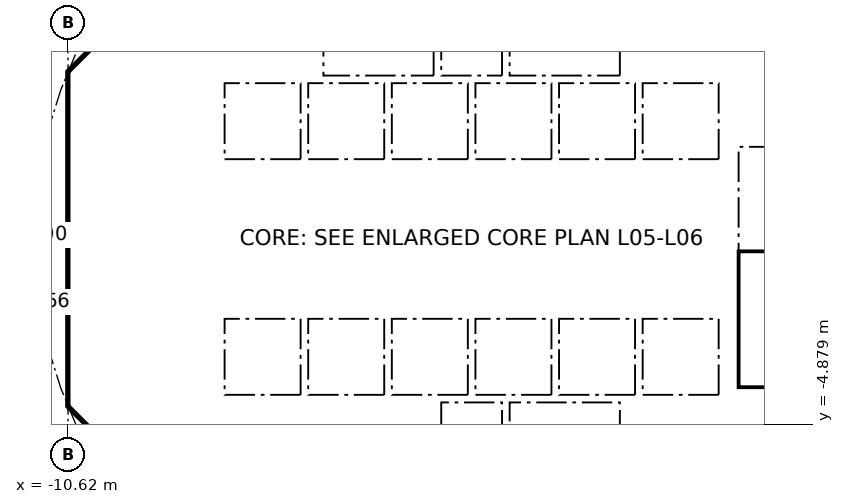
"""IFC4 building model, lengths in metres.
Left out: names, types, materials, properties, quantities, classifications, styles, units other than length and angle.
Written with IfcOpenShell. Run it as: python <this file> out.ifc"""

import sys

from ifc_helpers import new_model, si_unit, direction, frame, frame_2d, origin, place, context, subcontext, project, spatial, polyline, rectangle, outline, extrude, element, fill, save


model = new_model("IFC4")
c1 = context("Model", 3, precision=1e-05, world=origin(), true_north=direction((0.0, 1.0)))
c2 = subcontext(c1, "Body", "Model", "MODEL_VIEW")
j1 = project(units=[si_unit("LENGTHUNIT", "METRE"), si_unit("PLANEANGLEUNIT", "RADIAN")], contexts=[c1])
p1 = place(None, origin())
s1 = spatial("IfcSite", under=j1, at=p1, CompositionType="ELEMENT")
p2 = place(p1, origin())
s2 = spatial("IfcBuilding", under=s1, at=p2, CompositionType="ELEMENT")
p3 = place(p2, frame((0.0, 0.0, 27.0)))
s3 = spatial("IfcBuildingStorey", under=s2, at=p3, CompositionType="ELEMENT", Elevation=27.0)
p4 = place(p3, frame((9.988, 4.613, 0.0), z_axis=(0.0, 0.0, 1.0), x_axis=(-0.707106781187, 0.707106781187, 0.0)))
e1 = element("IfcWall", 1, at=p4, inside=s3, PredefinedType="SHEAR", context=c2, shape_type="SweptSolid", body=[
    extrude(rectangle(XDim=7.602, YDim=0.6, at=frame_2d((3.801, 0.0))), origin(), (0.0, 0.0, 1.0), 3.44),
])
p5 = place(p4, frame((3.201, 0.0, 0.0)))
e2 = element("IfcOpeningElement", 2, at=p5, cuts=e1, PredefinedType="OPENING", context=c2, shape_type="SweptSolid", body=[
    extrude(rectangle(XDim=1.2, YDim=2.1, at=frame_2d((0.6, 1.05))), frame((0.0, 0.31, 0.0), z_axis=(0.0, -1.0, 0.0), x_axis=(1.0, 0.0, 0.0)), (0.0, 0.0, 1.0), 0.62),
])
p6 = place(p3, frame((-4.613, 9.988, 0.0), z_axis=(0.0, 0.0, 1.0), x_axis=(-0.707106781187, -0.707106781187, 0.0)))
e3 = element("IfcWall", 3, at=p6, inside=s3, PredefinedType="SHEAR", context=c2, shape_type="SweptSolid", body=[
    extrude(rectangle(XDim=7.602, YDim=0.6, at=frame_2d((3.801, 0.0))), origin(), (0.0, 0.0, 1.0), 3.44),
])
p7 = place(p6, frame((0.351, 0.0, 0.0)))
e4 = element("IfcOpeningElement", 4, at=p7, cuts=e3, PredefinedType="OPENING", context=c2, shape_type="SweptSolid", body=[
    extrude(rectangle(XDim=1.1, YDim=2.1, at=frame_2d((0.55, 1.05))), frame((0.0, 0.31, 0.0), z_axis=(0.0, -1.0, 0.0), x_axis=(1.0, 0.0, 0.0)), (0.0, 0.0, 1.0), 0.62),
])
p8 = place(p3, frame((-10.325, 3.801, 0.0), z_axis=(0.0, 0.0, 1.0), x_axis=(0.0, -1.0, 0.0)))
e5 = element("IfcWall", 5, at=p8, inside=s3, PredefinedType="SHEAR", context=c2, shape_type="SweptSolid", body=[
    extrude(rectangle(XDim=7.602, YDim=0.6, at=frame_2d((3.801, 0.0))), origin(), (0.0, 0.0, 1.0), 3.44),
])
p9 = place(p8, frame((0.651, 0.0, 0.0)))
e6 = element("IfcOpeningElement", 6, at=p9, cuts=e5, PredefinedType="OPENING", context=c2, shape_type="SweptSolid", body=[
    extrude(rectangle(XDim=1.5, YDim=2.1, at=frame_2d((0.75, 1.05))), frame((0.0, 0.31, 0.0), z_axis=(0.0, -1.0, 0.0), x_axis=(1.0, 0.0, 0.0)), (0.0, 0.0, 1.0), 0.62),
])
p10 = place(p8, frame((5.451, 0.0, 0.0)))
e7 = element("IfcOpeningElement", 7, at=p10, cuts=e5, PredefinedType="OPENING", context=c2, shape_type="SweptSolid", body=[
    extrude(rectangle(XDim=1.5, YDim=2.1, at=frame_2d((0.75, 1.05))), frame((0.0, 0.31, 0.0), z_axis=(0.0, -1.0, 0.0), x_axis=(1.0, 0.0, 0.0)), (0.0, 0.0, 1.0), 0.62),
])
p11 = place(p3, frame((-9.988, -4.613, 0.0), z_axis=(0.0, 0.0, 1.0), x_axis=(0.707106781187, -0.707106781187, 0.0)))
e8 = element("IfcWall", 8, at=p11, inside=s3, PredefinedType="SHEAR", context=c2, shape_type="SweptSolid", body=[
    extrude(rectangle(XDim=7.602, YDim=0.6, at=frame_2d((3.801, 0.0))), origin(), (0.0, 0.0, 1.0), 3.44),
])
p12 = place(p11, frame((6.151, 0.0, 0.0)))
e9 = element("IfcOpeningElement", 9, at=p12, cuts=e8, PredefinedType="OPENING", context=c2, shape_type="SweptSolid", body=[
    extrude(rectangle(XDim=1.1, YDim=2.1, at=frame_2d((0.55, 1.05))), frame((0.0, 0.31, 0.0), z_axis=(0.0, -1.0, 0.0), x_axis=(1.0, 0.0, 0.0)), (0.0, 0.0, 1.0), 0.62),
])
p13 = place(p3, frame((4.613, -9.988, 0.0), z_axis=(0.0, 0.0, 1.0), x_axis=(0.707106781187, 0.707106781187, 0.0)))
e10 = element("IfcWall", 10, at=p13, inside=s3, PredefinedType="SHEAR", context=c2, shape_type="SweptSolid", body=[
    extrude(rectangle(XDim=7.602, YDim=0.6, at=frame_2d((3.801, 0.0))), origin(), (0.0, 0.0, 1.0), 3.44),
])
p14 = place(p13, frame((3.201, 0.0, 0.0)))
e11 = element("IfcOpeningElement", 11, at=p14, cuts=e10, PredefinedType="OPENING", context=c2, shape_type="SweptSolid", body=[
    extrude(rectangle(XDim=1.2, YDim=2.1, at=frame_2d((0.6, 1.05))), frame((0.0, 0.31, 0.0), z_axis=(0.0, -1.0, 0.0), x_axis=(1.0, 0.0, 0.0)), (0.0, 0.0, 1.0), 0.62),
])
p15 = place(p3, frame((-5.8, 4.3, 0.0), z_axis=(0.0, 0.0, 1.0), x_axis=(0.0, 1.0, 0.0)))
e12 = element("IfcWall", 12, at=p15, inside=s3, PredefinedType="PARTITIONING", context=c2, shape_type="SweptSolid", body=[
    extrude(rectangle(XDim=3.927, YDim=0.15, at=frame_2d((1.963, 0.0))), origin(), (0.0, 0.0, 1.0), 3.44),
])
p16 = place(p15, frame((0.413, 0.0, 0.0)))
e13 = element("IfcOpeningElement", 13, at=p16, cuts=e12, PredefinedType="OPENING", context=c2, shape_type="SweptSolid", body=[
    extrude(rectangle(XDim=0.9, YDim=2.1, at=frame_2d((0.45, 1.05))), frame((0.0, 0.085, 0.0), z_axis=(0.0, -1.0, 0.0), x_axis=(1.0, 0.0, 0.0)), (0.0, 0.0, 1.0), 0.17),
])
p17 = place(p15, frame((2.489, 0.0, 0.0)))
e14 = element("IfcOpeningElement", 14, at=p17, cuts=e12, PredefinedType="OPENING", context=c2, shape_type="SweptSolid", body=[
    extrude(rectangle(XDim=0.9, YDim=2.1, at=frame_2d((0.45, 1.05))), frame((0.0, 0.085, 0.0), z_axis=(0.0, -1.0, 0.0), x_axis=(1.0, 0.0, 0.0)), (0.0, 0.0, 1.0), 0.17),
])
p18 = place(p3, frame((4.0, 4.3, 0.0), z_axis=(0.0, 0.0, 1.0), x_axis=(0.0, 1.0, 0.0)))
e15 = element("IfcWall", 15, at=p18, inside=s3, PredefinedType="SOLIDWALL", context=c2, shape_type="SweptSolid", body=[
    extrude(rectangle(XDim=2.2, YDim=0.2, at=frame_2d((1.1, 0.0))), origin(), (0.0, 0.0, 1.0), 3.44),
])
p19 = place(p18, frame((0.55, 0.0, 0.0)))
e16 = element("IfcOpeningElement", 16, at=p19, cuts=e15, PredefinedType="OPENING", context=c2, shape_type="SweptSolid", body=[
    extrude(rectangle(XDim=1.1, YDim=2.1, at=frame_2d((0.55, 1.05))), frame((0.0, 0.11, 0.0), z_axis=(0.0, -1.0, 0.0), x_axis=(1.0, 0.0, 0.0)), (0.0, 0.0, 1.0), 0.22),
])
p20 = place(p3, frame((-4.0, 4.3, 0.0), z_axis=(0.0, 0.0, 1.0), x_axis=(0.0, 1.0, 0.0)))
e17 = element("IfcWall", 17, at=p20, inside=s3, PredefinedType="SOLIDWALL", context=c2, shape_type="SweptSolid", body=[
    extrude(rectangle(XDim=2.2, YDim=0.2, at=frame_2d((1.1, 0.0))), origin(), (0.0, 0.0, 1.0), 3.44),
])
p21 = place(p20, frame((0.55, 0.0, 0.0)))
e18 = element("IfcOpeningElement", 18, at=p21, cuts=e17, PredefinedType="OPENING", context=c2, shape_type="SweptSolid", body=[
    extrude(rectangle(XDim=1.1, YDim=2.1, at=frame_2d((0.55, 1.05))), frame((0.0, 0.11, 0.0), z_axis=(0.0, -1.0, 0.0), x_axis=(1.0, 0.0, 0.0)), (0.0, 0.0, 1.0), 0.22),
])
p22 = place(p3, frame((-6.7, 2.0, 0.0), z_axis=(0.0, 0.0, 1.0), x_axis=(1.0, 0.0, 0.0)))
e19 = element("IfcWall", 19, at=p22, inside=s3, PredefinedType="SOLIDWALL", context=c2, shape_type="SweptSolid", body=[
    extrude(rectangle(XDim=13.4, YDim=0.2, at=frame_2d((6.7, 0.0))), origin(), (0.0, 0.0, 1.0), 3.44),
])
p23 = place(p22, frame((0.65, 0.0, 0.0)))
e20 = element("IfcOpeningElement", 20, at=p23, cuts=e19, PredefinedType="OPENING", context=c2, shape_type="SweptSolid", body=[
    extrude(rectangle(XDim=1.1, YDim=2.1, at=frame_2d((0.55, 1.05))), frame((0.0, 0.11, 0.0), z_axis=(0.0, -1.0, 0.0), x_axis=(1.0, 0.0, 0.0)), (0.0, 0.0, 1.0), 0.22),
])
p24 = place(p22, frame((2.85, 0.0, 0.0)))
e21 = element("IfcOpeningElement", 21, at=p24, cuts=e19, PredefinedType="OPENING", context=c2, shape_type="SweptSolid", body=[
    extrude(rectangle(XDim=1.1, YDim=2.1, at=frame_2d((0.55, 1.05))), frame((0.0, 0.11, 0.0), z_axis=(0.0, -1.0, 0.0), x_axis=(1.0, 0.0, 0.0)), (0.0, 0.0, 1.0), 0.22),
])
p25 = place(p22, frame((5.05, 0.0, 0.0)))
e22 = element("IfcOpeningElement", 22, at=p25, cuts=e19, PredefinedType="OPENING", context=c2, shape_type="SweptSolid", body=[
    extrude(rectangle(XDim=1.1, YDim=2.1, at=frame_2d((0.55, 1.05))), frame((0.0, 0.11, 0.0), z_axis=(0.0, -1.0, 0.0), x_axis=(1.0, 0.0, 0.0)), (0.0, 0.0, 1.0), 0.22),
])
p26 = place(p3, frame((6.7, 4.0, 0.0), z_axis=(0.0, 0.0, 1.0), x_axis=(1.0, 0.0, 0.0)))
e23 = element("IfcWall", 23, at=p26, inside=s3, PredefinedType="SOLIDWALL", context=c2, shape_type="SweptSolid", body=[
    extrude(rectangle(XDim=3.325, YDim=0.2, at=frame_2d((1.662, 0.0))), origin(), (0.0, 0.0, 1.0), 3.44),
])
p27 = place(p26, frame((1.25, 0.0, 0.0)))
e24 = element("IfcOpeningElement", 24, at=p27, cuts=e23, PredefinedType="OPENING", context=c2, shape_type="SweptSolid", body=[
    extrude(rectangle(XDim=1.1, YDim=2.1, at=frame_2d((0.55, 1.05))), frame((0.0, 0.11, 0.0), z_axis=(0.0, -1.0, 0.0), x_axis=(1.0, 0.0, 0.0)), (0.0, 0.0, 1.0), 0.22),
])
p28 = place(p3, frame((-5.8, -8.227, 0.0), z_axis=(0.0, 0.0, 1.0), x_axis=(0.0, 1.0, 0.0)))
e25 = element("IfcWall", 25, at=p28, inside=s3, PredefinedType="PARTITIONING", context=c2, shape_type="SweptSolid", body=[
    extrude(rectangle(XDim=3.927, YDim=0.15, at=frame_2d((1.963, 0.0))), origin(), (0.0, 0.0, 1.0), 3.44),
])
p29 = place(p28, frame((2.615, 0.0, 0.0)))
e26 = element("IfcOpeningElement", 26, at=p29, cuts=e25, PredefinedType="OPENING", context=c2, shape_type="SweptSolid", body=[
    extrude(rectangle(XDim=0.9, YDim=2.1, at=frame_2d((0.45, 1.05))), frame((0.0, 0.085, 0.0), z_axis=(0.0, -1.0, 0.0), x_axis=(1.0, 0.0, 0.0)), (0.0, 0.0, 1.0), 0.17),
])
p30 = place(p28, frame((0.539, 0.0, 0.0)))
e27 = element("IfcOpeningElement", 27, at=p30, cuts=e25, PredefinedType="OPENING", context=c2, shape_type="SweptSolid", body=[
    extrude(rectangle(XDim=0.9, YDim=2.1, at=frame_2d((0.45, 1.05))), frame((0.0, 0.085, 0.0), z_axis=(0.0, -1.0, 0.0), x_axis=(1.0, 0.0, 0.0)), (0.0, 0.0, 1.0), 0.17),
])
p31 = place(p3, frame((4.0, -6.5, 0.0), z_axis=(0.0, 0.0, 1.0), x_axis=(0.0, 1.0, 0.0)))
e28 = element("IfcWall", 28, at=p31, inside=s3, PredefinedType="SOLIDWALL", context=c2, shape_type="SweptSolid", body=[
    extrude(rectangle(XDim=2.2, YDim=0.2, at=frame_2d((1.1, 0.0))), origin(), (0.0, 0.0, 1.0), 3.44),
])
p32 = place(p31, frame((0.55, 0.0, 0.0)))
e29 = element("IfcOpeningElement", 29, at=p32, cuts=e28, PredefinedType="OPENING", context=c2, shape_type="SweptSolid", body=[
    extrude(rectangle(XDim=1.1, YDim=2.1, at=frame_2d((0.55, 1.05))), frame((0.0, 0.11, 0.0), z_axis=(0.0, -1.0, 0.0), x_axis=(1.0, 0.0, 0.0)), (0.0, 0.0, 1.0), 0.22),
])
p33 = place(p3, frame((-4.0, -6.5, 0.0), z_axis=(0.0, 0.0, 1.0), x_axis=(0.0, 1.0, 0.0)))
e30 = element("IfcWall", 30, at=p33, inside=s3, PredefinedType="SOLIDWALL", context=c2, shape_type="SweptSolid", body=[
    extrude(rectangle(XDim=2.2, YDim=0.2, at=frame_2d((1.1, 0.0))), origin(), (0.0, 0.0, 1.0), 3.44),
])
p34 = place(p33, frame((0.65, 0.0, 0.0)))
e31 = element("IfcOpeningElement", 31, at=p34, cuts=e30, PredefinedType="OPENING", context=c2, shape_type="SweptSolid", body=[
    extrude(rectangle(XDim=0.9, YDim=2.1, at=frame_2d((0.45, 1.05))), frame((0.0, 0.11, 0.0), z_axis=(0.0, -1.0, 0.0), x_axis=(1.0, 0.0, 0.0)), (0.0, 0.0, 1.0), 0.22),
])
p35 = place(p3, frame((-6.7, -2.0, 0.0), z_axis=(0.0, 0.0, 1.0), x_axis=(1.0, 0.0, 0.0)))
e32 = element("IfcWall", 32, at=p35, inside=s3, PredefinedType="SOLIDWALL", context=c2, shape_type="SweptSolid", body=[
    extrude(rectangle(XDim=13.4, YDim=0.2, at=frame_2d((6.7, 0.0))), origin(), (0.0, 0.0, 1.0), 3.44),
])
p36 = place(p35, frame((0.65, 0.0, 0.0)))
e33 = element("IfcOpeningElement", 33, at=p36, cuts=e32, PredefinedType="OPENING", context=c2, shape_type="SweptSolid", body=[
    extrude(rectangle(XDim=1.1, YDim=2.1, at=frame_2d((0.55, 1.05))), frame((0.0, 0.11, 0.0), z_axis=(0.0, -1.0, 0.0), x_axis=(1.0, 0.0, 0.0)), (0.0, 0.0, 1.0), 0.22),
])
p37 = place(p35, frame((2.85, 0.0, 0.0)))
e34 = element("IfcOpeningElement", 34, at=p37, cuts=e32, PredefinedType="OPENING", context=c2, shape_type="SweptSolid", body=[
    extrude(rectangle(XDim=1.1, YDim=2.1, at=frame_2d((0.55, 1.05))), frame((0.0, 0.11, 0.0), z_axis=(0.0, -1.0, 0.0), x_axis=(1.0, 0.0, 0.0)), (0.0, 0.0, 1.0), 0.22),
])
p38 = place(p3, origin())
e35 = element("IfcWall", 35, at=p38, inside=s3, PredefinedType="SHEAR", context=c2, shape_type="SweptSolid", body=[
    extrude(outline(polyline([(-10.625, -3.801), (-10.025, -3.801), (-10.025, -4.152), (-9.776, -4.401), (-10.2, -4.825), (-10.625, -4.401), (-10.625, -3.801)])), origin(), (0.0, 0.0, 1.0), 3.44),
])
p39 = place(p3, origin())
e36 = element("IfcWall", 36, at=p39, inside=s3, PredefinedType="SHEAR", context=c2, shape_type="SweptSolid", body=[
    extrude(outline(polyline([(-10.2, 4.825), (-9.776, 4.401), (-10.025, 4.152), (-10.025, 3.801), (-10.625, 3.801), (-10.625, 4.401), (-10.2, 4.825)])), origin(), (0.0, 0.0, 1.0), 3.44),
])
for number, where, z_axis, x_axis in (
    (37, (-10.025, -4.0, 0.0), (0.0, 0.0, 1.0), (1.0, 0.0, 0.0)),
    (38, (-10.025, 4.0, 0.0), (0.0, 0.0, 1.0), (1.0, 0.0, 0.0)),
):
    element("IfcWall", number, at=place(p3, frame(where, z_axis=z_axis, x_axis=x_axis)), inside=s3, PredefinedType="PARTITIONING", context=c2, shape_type="SweptSolid", body=[
        extrude(rectangle(XDim=3.325, YDim=0.2, at=frame_2d((1.662, 0.0))), origin(), (0.0, 0.0, 1.0), 3.44),
    ])
for number, where, z_axis, x_axis in (
    (39, (-0.9, -6.5, 0.0), (0.0, 0.0, 1.0), (0.0, 1.0, 0.0)),
    (40, (0.9, -6.5, 0.0), (0.0, 0.0, 1.0), (0.0, 1.0, 0.0)),
):
    element("IfcWall", number, at=place(p3, frame(where, z_axis=z_axis, x_axis=x_axis)), inside=s3, PredefinedType="SOLIDWALL", context=c2, shape_type="SweptSolid", body=[
        extrude(rectangle(XDim=2.2, YDim=0.2, at=frame_2d((1.1, 0.0))), origin(), (0.0, 0.0, 1.0), 3.44),
    ])
p40 = place(p3, origin())
e41 = element("IfcWall", 41, at=p40, inside=s3, PredefinedType="SOLIDWALL", context=c2, shape_type="SweptSolid", body=[
    extrude(outline(polyline([(-6.7, -2.1), (-6.5, -2.1), (-6.5, -4.1), (-4.5, -4.1), (-4.5, -2.1), (-4.3, -2.1), (-4.3, -4.1), (-2.3, -4.1), (-2.3, -2.1), (-2.1, -2.1), (-2.1, -4.1), (-0.1, -4.1), (-0.1, -2.1), (0.1, -2.1), (0.1, -4.1), (2.1, -4.1), (2.1, -2.1), (2.3, -2.1), (2.3, -4.1), (4.3, -4.1), (4.3, -2.1), (4.5, -2.1), (4.5, -4.1), (6.5, -4.1), (6.5, -2.1), (6.7, -2.1), (6.7, -4.3), (-6.7, -4.3), (-6.7, -2.1)])), origin(), (0.0, 0.0, 1.0), 3.44),
])
for number, where, z_axis, x_axis in (
    (42, (-0.9, 4.3, 0.0), (0.0, 0.0, 1.0), (0.0, 1.0, 0.0)),
    (43, (0.9, 4.3, 0.0), (0.0, 0.0, 1.0), (0.0, 1.0, 0.0)),
):
    element("IfcWall", number, at=place(p3, frame(where, z_axis=z_axis, x_axis=x_axis)), inside=s3, PredefinedType="SOLIDWALL", context=c2, shape_type="SweptSolid", body=[
        extrude(rectangle(XDim=2.2, YDim=0.2, at=frame_2d((1.1, 0.0))), origin(), (0.0, 0.0, 1.0), 3.44),
    ])
p41 = place(p3, origin())
e44 = element("IfcWall", 44, at=p41, inside=s3, PredefinedType="SOLIDWALL", context=c2, shape_type="SweptSolid", body=[
    extrude(outline(polyline([(-6.5, 2.1), (-6.7, 2.1), (-6.7, 4.3), (6.7, 4.3), (6.7, 2.1), (6.5, 2.1), (6.5, 4.1), (4.5, 4.1), (4.5, 2.1), (4.3, 2.1), (4.3, 4.1), (2.3, 4.1), (2.3, 2.1), (2.1, 2.1), (2.1, 4.1), (0.1, 4.1), (0.1, 2.1), (-0.1, 2.1), (-0.1, 4.1), (-2.1, 4.1), (-2.1, 2.1), (-2.3, 2.1), (-2.3, 4.1), (-4.3, 4.1), (-4.3, 2.1), (-4.5, 2.1), (-4.5, 4.1), (-6.5, 4.1), (-6.5, 2.1)])), origin(), (0.0, 0.0, 1.0), 3.44),
])
p42 = place(p3, origin())
e45 = element("IfcWall", 45, at=p42, inside=s3, PredefinedType="SOLIDWALL", context=c2, shape_type="SweptSolid", body=[
    extrude(outline(polyline([(7.025, -3.9), (6.7, -3.9), (6.7, 3.9), (7.025, 3.9), (7.025, -3.9)])), origin(), (0.0, 0.0, 1.0), 3.44),
])
p43 = place(p3, origin())
e46 = element("IfcWall", 46, at=p43, inside=s3, PredefinedType="SOLIDWALL", context=c2, shape_type="SweptSolid", body=[
    extrude(outline(polyline([(10.025, -4.1), (6.7, -4.1), (6.7, -3.9), (10.025, -3.9), (10.025, -4.1)])), origin(), (0.0, 0.0, 1.0), 3.44),
])
p44 = place(p23, origin())
e47 = element("IfcDoor", 47, at=p44, inside=s3, OperationType="DOUBLE_DOOR_SLIDING", PredefinedType="DOOR", context=c2, shape_type="SweptSolid", body=[
    extrude(rectangle(XDim=1.1, YDim=2.1, at=frame_2d((0.55, 1.05))), frame((0.0, 0.025, 0.0), z_axis=(0.0, -1.0, 0.0), x_axis=(1.0, 0.0, 0.0)), (0.0, 0.0, 1.0), 0.05),
])
fill(e20, e47)
p45 = place(p24, origin())
e48 = element("IfcDoor", 48, at=p45, inside=s3, OperationType="DOUBLE_DOOR_SLIDING", PredefinedType="DOOR", context=c2, shape_type="SweptSolid", body=[
    extrude(rectangle(XDim=1.1, YDim=2.1, at=frame_2d((0.55, 1.05))), frame((0.0, 0.025, 0.0), z_axis=(0.0, -1.0, 0.0), x_axis=(1.0, 0.0, 0.0)), (0.0, 0.0, 1.0), 0.05),
])
fill(e21, e48)
p46 = place(p25, origin())
e49 = element("IfcDoor", 49, at=p46, inside=s3, OperationType="DOUBLE_DOOR_SLIDING", PredefinedType="DOOR", context=c2, shape_type="SweptSolid", body=[
    extrude(rectangle(XDim=1.1, YDim=2.1, at=frame_2d((0.55, 1.05))), frame((0.0, 0.025, 0.0), z_axis=(0.0, -1.0, 0.0), x_axis=(1.0, 0.0, 0.0)), (0.0, 0.0, 1.0), 0.05),
])
fill(e22, e49)
p47 = place(p36, origin())
e50 = element("IfcDoor", 50, at=p47, inside=s3, OperationType="DOUBLE_DOOR_SLIDING", PredefinedType="DOOR", context=c2, shape_type="SweptSolid", body=[
    extrude(rectangle(XDim=1.1, YDim=2.1, at=frame_2d((0.55, 1.05))), frame((0.0, 0.025, 0.0), z_axis=(0.0, -1.0, 0.0), x_axis=(1.0, 0.0, 0.0)), (0.0, 0.0, 1.0), 0.05),
])
fill(e33, e50)
p48 = place(p37, origin())
e51 = element("IfcDoor", 51, at=p48, inside=s3, OperationType="DOUBLE_DOOR_SLIDING", PredefinedType="DOOR", context=c2, shape_type="SweptSolid", body=[
    extrude(rectangle(XDim=1.1, YDim=2.1, at=frame_2d((0.55, 1.05))), frame((0.0, 0.025, 0.0), z_axis=(0.0, -1.0, 0.0), x_axis=(1.0, 0.0, 0.0)), (0.0, 0.0, 1.0), 0.05),
])
fill(e34, e51)
p49 = place(p19, origin())
e52 = element("IfcDoor", 52, at=p49, inside=s3, OperationType="DOUBLE_DOOR_SLIDING", PredefinedType="DOOR", context=c2, shape_type="SweptSolid", body=[
    extrude(rectangle(XDim=1.1, YDim=2.1, at=frame_2d((0.55, 1.05))), frame((0.0, 0.025, 0.0), z_axis=(0.0, -1.0, 0.0), x_axis=(1.0, 0.0, 0.0)), (0.0, 0.0, 1.0), 0.05),
])
fill(e16, e52)
p50 = place(p32, origin())
e53 = element("IfcDoor", 53, at=p50, inside=s3, OperationType="DOUBLE_DOOR_SLIDING", PredefinedType="DOOR", context=c2, shape_type="SweptSolid", body=[
    extrude(rectangle(XDim=1.1, YDim=2.1, at=frame_2d((0.55, 1.05))), frame((0.0, 0.025, 0.0), z_axis=(0.0, -1.0, 0.0), x_axis=(1.0, 0.0, 0.0)), (0.0, 0.0, 1.0), 0.05),
])
fill(e29, e53)
p51 = place(p21, origin())
e54 = element("IfcDoor", 54, at=p51, inside=s3, OperationType="DOUBLE_DOOR_SLIDING", PredefinedType="DOOR", context=c2, shape_type="SweptSolid", body=[
    extrude(rectangle(XDim=1.1, YDim=2.1, at=frame_2d((0.55, 1.05))), frame((0.0, 0.025, 0.0), z_axis=(0.0, -1.0, 0.0), x_axis=(1.0, 0.0, 0.0)), (0.0, 0.0, 1.0), 0.05),
])
fill(e18, e54)
p52 = place(p16, origin())
e55 = element("IfcDoor", 55, at=p52, inside=s3, OperationType="SINGLE_SWING_LEFT", PredefinedType="DOOR", context=c2, shape_type="SweptSolid", body=[
    extrude(rectangle(XDim=0.9, YDim=2.1, at=frame_2d((0.45, 1.05))), frame((0.0, 0.025, 0.0), z_axis=(0.0, -1.0, 0.0), x_axis=(1.0, 0.0, 0.0)), (0.0, 0.0, 1.0), 0.05),
])
fill(e13, e55)
p53 = place(p29, origin())
e56 = element("IfcDoor", 56, at=p53, inside=s3, OperationType="SINGLE_SWING_LEFT", PredefinedType="DOOR", context=c2, shape_type="SweptSolid", body=[
    extrude(rectangle(XDim=0.9, YDim=2.1, at=frame_2d((0.45, 1.05))), frame((0.0, 0.025, 0.0), z_axis=(0.0, -1.0, 0.0), x_axis=(1.0, 0.0, 0.0)), (0.0, 0.0, 1.0), 0.05),
])
fill(e26, e56)
p54 = place(p9, origin())
e57 = element("IfcDoor", 57, at=p54, inside=s3, OperationType="DOUBLE_DOOR_SINGLE_SWING", PredefinedType="DOOR", context=c2, shape_type="SweptSolid", body=[
    extrude(rectangle(XDim=1.5, YDim=2.1, at=frame_2d((0.75, 1.05))), frame((0.0, 0.025, 0.0), z_axis=(0.0, -1.0, 0.0), x_axis=(1.0, 0.0, 0.0)), (0.0, 0.0, 1.0), 0.05),
])
fill(e6, e57)
p55 = place(p10, origin())
e58 = element("IfcDoor", 58, at=p55, inside=s3, OperationType="DOUBLE_DOOR_SINGLE_SWING", PredefinedType="DOOR", context=c2, shape_type="SweptSolid", body=[
    extrude(rectangle(XDim=1.5, YDim=2.1, at=frame_2d((0.75, 1.05))), frame((0.0, 0.025, 0.0), z_axis=(0.0, -1.0, 0.0), x_axis=(1.0, 0.0, 0.0)), (0.0, 0.0, 1.0), 0.05),
])
fill(e7, e58)
save(model, sys.argv[1])
